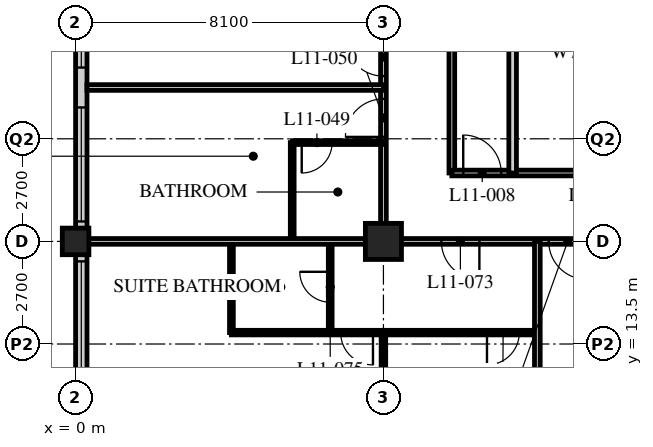
"""IFC4 building model, lengths in metres.
Left out: names, types, materials, properties, quantities, classifications, styles, units other than length and angle.
Written with IfcOpenShell. Run it as: python <this file> out.ifc"""

import sys

from ifc_helpers import new_model, si_unit, direction, frame, frame_2d, origin, origin_2d, place, context, subcontext, project, spatial, rectangle, hollow_rectangle, extrude, element, fill, save


model = new_model("IFC4")
c1 = context("Model", 3, precision=1e-05, world=origin(), true_north=direction((0.0, 1.0)))
c2 = subcontext(c1, "Body", "Model", "MODEL_VIEW")
j1 = project(units=[si_unit("LENGTHUNIT", "METRE"), si_unit("PLANEANGLEUNIT", "RADIAN")], contexts=[c1])
p1 = place(None, origin())
s1 = spatial("IfcSite", under=j1, at=p1, CompositionType="ELEMENT")
p2 = place(p1, origin())
s2 = spatial("IfcBuilding", under=s1, at=p2, CompositionType="ELEMENT")
p3 = place(p2, frame((0.0, 0.0, 50.0)))
s3 = spatial("IfcBuildingStorey", under=s2, at=p3, CompositionType="ELEMENT", Elevation=50.0)
p4 = place(p3, frame((0.0, 16.2, 0.0), z_axis=(0.0, 0.0, 1.0), x_axis=(1.0, 0.0, 0.0)))
e1 = element("IfcColumn", 1, at=p4, inside=s3, PredefinedType="COLUMN", context=c2, shape_type="SweptSolid", body=[
    extrude(hollow_rectangle(XDim=0.7, YDim=0.7, WallThickness=0.06, at=origin_2d()), origin(), (0.0, 0.0, 1.0), 3.4),
])
p5 = place(p3, frame((8.1, 16.2, 0.0), z_axis=(0.0, 0.0, 1.0), x_axis=(1.0, 0.0, 0.0)))
e2 = element("IfcColumn", 2, at=p5, inside=s3, PredefinedType="COLUMN", context=c2, shape_type="SweptSolid", body=[
    extrude(hollow_rectangle(XDim=0.95, YDim=0.95, WallThickness=0.095, at=origin_2d()), origin(), (0.0, 0.0, 1.0), 3.4),
])
p6 = place(p3, frame((0.15, 40.2, 0.0), z_axis=(0.0, 0.0, 1.0), x_axis=(0.0, -1.0, 0.0)))
e3 = element("IfcWall", 3, at=p6, inside=s3, PredefinedType="SOLIDWALL", context=c2, shape_type="SweptSolid", body=[
    extrude(rectangle(XDim=32.1, YDim=0.3, at=frame_2d((16.05, 0.0))), origin(), (0.0, 0.0, 1.0), 3.19),
])
p7 = place(p6, frame((0.225, 0.0, 0.9)))
e4 = element("IfcOpeningElement", 4, at=p7, cuts=e3, PredefinedType="OPENING", context=c2, shape_type="SweptSolid", body=[
    extrude(rectangle(XDim=3.0, YDim=2.0, at=frame_2d((1.5, 1.0))), frame((0.0, 0.16, 0.0), z_axis=(0.0, -1.0, 0.0), x_axis=(1.0, 0.0, 0.0)), (0.0, 0.0, 1.0), 0.32),
])
p8 = place(p6, frame((4.275, 0.0, 0.9)))
e5 = element("IfcOpeningElement", 5, at=p8, cuts=e3, PredefinedType="OPENING", context=c2, shape_type="SweptSolid", body=[
    extrude(rectangle(XDim=3.0, YDim=2.0, at=frame_2d((1.5, 1.0))), frame((0.0, 0.16, 0.0), z_axis=(0.0, -1.0, 0.0), x_axis=(1.0, 0.0, 0.0)), (0.0, 0.0, 1.0), 0.32),
])
p9 = place(p6, frame((8.325, 0.0, 0.9)))
e6 = element("IfcOpeningElement", 6, at=p9, cuts=e3, PredefinedType="OPENING", context=c2, shape_type="SweptSolid", body=[
    extrude(rectangle(XDim=3.0, YDim=2.0, at=frame_2d((1.5, 1.0))), frame((0.0, 0.16, 0.0), z_axis=(0.0, -1.0, 0.0), x_axis=(1.0, 0.0, 0.0)), (0.0, 0.0, 1.0), 0.32),
])
p10 = place(p6, frame((12.375, 0.0, 0.9)))
e7 = element("IfcOpeningElement", 7, at=p10, cuts=e3, PredefinedType="OPENING", context=c2, shape_type="SweptSolid", body=[
    extrude(rectangle(XDim=3.0, YDim=2.0, at=frame_2d((1.5, 1.0))), frame((0.0, 0.16, 0.0), z_axis=(0.0, -1.0, 0.0), x_axis=(1.0, 0.0, 0.0)), (0.0, 0.0, 1.0), 0.32),
])
p11 = place(p6, frame((16.425, 0.0, 0.9)))
e8 = element("IfcOpeningElement", 8, at=p11, cuts=e3, PredefinedType="OPENING", context=c2, shape_type="SweptSolid", body=[
    extrude(rectangle(XDim=3.0, YDim=2.0, at=frame_2d((1.5, 1.0))), frame((0.0, 0.16, 0.0), z_axis=(0.0, -1.0, 0.0), x_axis=(1.0, 0.0, 0.0)), (0.0, 0.0, 1.0), 0.32),
])
p12 = place(p6, frame((20.475, 0.0, 0.9)))
e9 = element("IfcOpeningElement", 9, at=p12, cuts=e3, PredefinedType="OPENING", context=c2, shape_type="SweptSolid", body=[
    extrude(rectangle(XDim=3.0, YDim=2.0, at=frame_2d((1.5, 1.0))), frame((0.0, 0.16, 0.0), z_axis=(0.0, -1.0, 0.0), x_axis=(1.0, 0.0, 0.0)), (0.0, 0.0, 1.0), 0.32),
])
p13 = place(p6, frame((24.525, 0.0, 0.9)))
e10 = element("IfcOpeningElement", 10, at=p13, cuts=e3, PredefinedType="OPENING", context=c2, shape_type="SweptSolid", body=[
    extrude(rectangle(XDim=3.0, YDim=2.0, at=frame_2d((1.5, 1.0))), frame((0.0, 0.16, 0.0), z_axis=(0.0, -1.0, 0.0), x_axis=(1.0, 0.0, 0.0)), (0.0, 0.0, 1.0), 0.32),
])
p14 = place(p6, frame((28.575, 0.0, 0.9)))
e11 = element("IfcOpeningElement", 11, at=p14, cuts=e3, PredefinedType="OPENING", context=c2, shape_type="SweptSolid", body=[
    extrude(rectangle(XDim=3.0, YDim=2.0, at=frame_2d((1.5, 1.0))), frame((0.0, 0.16, 0.0), z_axis=(0.0, -1.0, 0.0), x_axis=(1.0, 0.0, 0.0)), (0.0, 0.0, 1.0), 0.32),
])
p15 = place(p3, frame((8.1, 16.2, 0.0), z_axis=(0.0, 0.0, 1.0), x_axis=(1.0, 0.0, 0.0)))
e12 = element("IfcWall", 12, at=p15, inside=s3, PredefinedType="PARTITIONING", context=c2, shape_type="SweptSolid", body=[
    extrude(rectangle(XDim=40.5, YDim=0.15, at=frame_2d((20.25, 0.0))), origin(), (0.0, 0.0, 1.0), 2.578),
])
p16 = place(p15, frame((4.35, 0.0, 0.0)))
e13 = element("IfcOpeningElement", 13, at=p16, cuts=e12, PredefinedType="OPENING", context=c2, shape_type="SweptSolid", body=[
    extrude(rectangle(XDim=1.0, YDim=2.1, at=frame_2d((0.5, 1.05))), frame((0.0, 0.085, 0.0), z_axis=(0.0, -1.0, 0.0), x_axis=(1.0, 0.0, 0.0)), (0.0, 0.0, 1.0), 0.17),
])
p17 = place(p15, frame((10.85, 0.0, 0.0)))
e14 = element("IfcOpeningElement", 14, at=p17, cuts=e12, PredefinedType="OPENING", context=c2, shape_type="SweptSolid", body=[
    extrude(rectangle(XDim=1.0, YDim=2.1, at=frame_2d((0.5, 1.05))), frame((0.0, 0.085, 0.0), z_axis=(0.0, -1.0, 0.0), x_axis=(1.0, 0.0, 0.0)), (0.0, 0.0, 1.0), 0.17),
])
p18 = place(p15, frame((12.75, 0.0, 0.0)))
e15 = element("IfcOpeningElement", 15, at=p18, cuts=e12, PredefinedType="OPENING", context=c2, shape_type="SweptSolid", body=[
    extrude(rectangle(XDim=1.0, YDim=2.1, at=frame_2d((0.5, 1.05))), frame((0.0, 0.085, 0.0), z_axis=(0.0, -1.0, 0.0), x_axis=(1.0, 0.0, 0.0)), (0.0, 0.0, 1.0), 0.17),
])
p19 = place(p15, frame((18.95, 0.0, 0.0)))
e16 = element("IfcOpeningElement", 16, at=p19, cuts=e12, PredefinedType="OPENING", context=c2, shape_type="SweptSolid", body=[
    extrude(rectangle(XDim=1.0, YDim=2.1, at=frame_2d((0.5, 1.05))), frame((0.0, 0.085, 0.0), z_axis=(0.0, -1.0, 0.0), x_axis=(1.0, 0.0, 0.0)), (0.0, 0.0, 1.0), 0.17),
])
p20 = place(p15, frame((20.55, 0.0, 0.0)))
e17 = element("IfcOpeningElement", 17, at=p20, cuts=e12, PredefinedType="OPENING", context=c2, shape_type="SweptSolid", body=[
    extrude(rectangle(XDim=1.0, YDim=2.1, at=frame_2d((0.5, 1.05))), frame((0.0, 0.085, 0.0), z_axis=(0.0, -1.0, 0.0), x_axis=(1.0, 0.0, 0.0)), (0.0, 0.0, 1.0), 0.17),
])
p21 = place(p15, frame((27.05, 0.0, 0.0)))
e18 = element("IfcOpeningElement", 18, at=p21, cuts=e12, PredefinedType="OPENING", context=c2, shape_type="SweptSolid", body=[
    extrude(rectangle(XDim=1.0, YDim=2.1, at=frame_2d((0.5, 1.05))), frame((0.0, 0.085, 0.0), z_axis=(0.0, -1.0, 0.0), x_axis=(1.0, 0.0, 0.0)), (0.0, 0.0, 1.0), 0.17),
])
p22 = place(p15, frame((28.95, 0.0, 0.0)))
e19 = element("IfcOpeningElement", 19, at=p22, cuts=e12, PredefinedType="OPENING", context=c2, shape_type="SweptSolid", body=[
    extrude(rectangle(XDim=1.0, YDim=2.1, at=frame_2d((0.5, 1.05))), frame((0.0, 0.085, 0.0), z_axis=(0.0, -1.0, 0.0), x_axis=(1.0, 0.0, 0.0)), (0.0, 0.0, 1.0), 0.17),
])
p23 = place(p15, frame((34.85, 0.0, 0.0)))
e20 = element("IfcOpeningElement", 20, at=p23, cuts=e12, PredefinedType="OPENING", context=c2, shape_type="SweptSolid", body=[
    extrude(rectangle(XDim=1.0, YDim=2.1, at=frame_2d((0.5, 1.05))), frame((0.0, 0.085, 0.0), z_axis=(0.0, -1.0, 0.0), x_axis=(1.0, 0.0, 0.0)), (0.0, 0.0, 1.0), 0.17),
])
p24 = place(p15, frame((1.525, 0.0, 0.0)))
e21 = element("IfcOpeningElement", 21, at=p24, cuts=e12, PredefinedType="OPENING", context=c2, shape_type="SweptSolid", body=[
    extrude(rectangle(XDim=1.0, YDim=2.1, at=frame_2d((0.5, 1.05))), frame((0.0, 0.085, 0.0), z_axis=(0.0, -1.0, 0.0), x_axis=(1.0, 0.0, 0.0)), (0.0, 0.0, 1.0), 0.17),
])
p25 = place(p15, frame((37.975, 0.0, 0.0)))
e22 = element("IfcOpeningElement", 22, at=p25, cuts=e12, PredefinedType="OPENING", context=c2, shape_type="SweptSolid", body=[
    extrude(rectangle(XDim=1.0, YDim=2.1, at=frame_2d((0.5, 1.05))), frame((0.0, 0.085, 0.0), z_axis=(0.0, -1.0, 0.0), x_axis=(1.0, 0.0, 0.0)), (0.0, 0.0, 1.0), 0.17),
])
p26 = place(p3, frame((8.1, 16.2, 0.0), z_axis=(0.0, 0.0, 1.0), x_axis=(0.0, 1.0, 0.0)))
e23 = element("IfcWall", 23, at=p26, inside=s3, PredefinedType="PARTITIONING", context=c2, shape_type="SweptSolid", body=[
    extrude(rectangle(XDim=26.1, YDim=0.15, at=frame_2d((13.05, 0.0))), origin(), (0.0, 0.0, 1.0), 2.578),
])
p27 = place(p26, frame((2.75, 0.0, 0.0)))
e24 = element("IfcOpeningElement", 24, at=p27, cuts=e23, PredefinedType="OPENING", context=c2, shape_type="SweptSolid", body=[
    extrude(rectangle(XDim=1.0, YDim=2.1, at=frame_2d((0.5, 1.05))), frame((0.0, 0.085, 0.0), z_axis=(0.0, -1.0, 0.0), x_axis=(1.0, 0.0, 0.0)), (0.0, 0.0, 1.0), 0.17),
])
p28 = place(p26, frame((4.35, 0.0, 0.0)))
e25 = element("IfcOpeningElement", 25, at=p28, cuts=e23, PredefinedType="OPENING", context=c2, shape_type="SweptSolid", body=[
    extrude(rectangle(XDim=1.0, YDim=2.1, at=frame_2d((0.5, 1.05))), frame((0.0, 0.085, 0.0), z_axis=(0.0, -1.0, 0.0), x_axis=(1.0, 0.0, 0.0)), (0.0, 0.0, 1.0), 0.17),
])
p29 = place(p26, frame((10.85, 0.0, 0.0)))
e26 = element("IfcOpeningElement", 26, at=p29, cuts=e23, PredefinedType="OPENING", context=c2, shape_type="SweptSolid", body=[
    extrude(rectangle(XDim=1.0, YDim=2.1, at=frame_2d((0.5, 1.05))), frame((0.0, 0.085, 0.0), z_axis=(0.0, -1.0, 0.0), x_axis=(1.0, 0.0, 0.0)), (0.0, 0.0, 1.0), 0.17),
])
p30 = place(p26, frame((12.45, 0.0, 0.0)))
e27 = element("IfcOpeningElement", 27, at=p30, cuts=e23, PredefinedType="OPENING", context=c2, shape_type="SweptSolid", body=[
    extrude(rectangle(XDim=1.0, YDim=2.1, at=frame_2d((0.5, 1.05))), frame((0.0, 0.085, 0.0), z_axis=(0.0, -1.0, 0.0), x_axis=(1.0, 0.0, 0.0)), (0.0, 0.0, 1.0), 0.17),
])
p31 = place(p26, frame((18.65, 0.0, 0.0)))
e28 = element("IfcOpeningElement", 28, at=p31, cuts=e23, PredefinedType="OPENING", context=c2, shape_type="SweptSolid", body=[
    extrude(rectangle(XDim=1.0, YDim=2.1, at=frame_2d((0.5, 1.05))), frame((0.0, 0.085, 0.0), z_axis=(0.0, -1.0, 0.0), x_axis=(1.0, 0.0, 0.0)), (0.0, 0.0, 1.0), 0.17),
])
p32 = place(p26, frame((22.7, 0.0, 0.0)))
e29 = element("IfcOpeningElement", 29, at=p32, cuts=e23, PredefinedType="OPENING", context=c2, shape_type="SweptSolid", body=[
    extrude(rectangle(XDim=1.0, YDim=2.1, at=frame_2d((0.5, 1.05))), frame((0.0, 0.085, 0.0), z_axis=(0.0, -1.0, 0.0), x_axis=(1.0, 0.0, 0.0)), (0.0, 0.0, 1.0), 0.17),
])
p33 = place(p3, frame((9.9, 40.5, 0.0), z_axis=(0.0, 0.0, 1.0), x_axis=(0.0, -1.0, 0.0)))
e30 = element("IfcWall", 30, at=p33, inside=s3, PredefinedType="PARTITIONING", context=c2, shape_type="SweptSolid", body=[
    extrude(rectangle(XDim=22.5, YDim=0.15, at=frame_2d((11.25, 0.0))), origin(), (0.0, 0.0, 1.0), 3.19),
])
p34 = place(p33, frame((14.271, 0.0, 0.0)))
e31 = element("IfcOpeningElement", 31, at=p34, cuts=e30, PredefinedType="OPENING", context=c2, shape_type="SweptSolid", body=[
    extrude(rectangle(XDim=1.0, YDim=2.1, at=frame_2d((0.5, 1.05))), frame((0.0, 0.085, 0.0), z_axis=(0.0, -1.0, 0.0), x_axis=(1.0, 0.0, 0.0)), (0.0, 0.0, 1.0), 0.17),
])
p35 = place(p33, frame((10.221, 0.0, 0.0)))
e32 = element("IfcOpeningElement", 32, at=p35, cuts=e30, PredefinedType="OPENING", context=c2, shape_type="SweptSolid", body=[
    extrude(rectangle(XDim=1.0, YDim=2.1, at=frame_2d((0.5, 1.05))), frame((0.0, 0.085, 0.0), z_axis=(0.0, -1.0, 0.0), x_axis=(1.0, 0.0, 0.0)), (0.0, 0.0, 1.0), 0.17),
])
p36 = place(p33, frame((6.8, 0.0, 0.0)))
e33 = element("IfcOpeningElement", 33, at=p36, cuts=e30, PredefinedType="OPENING", context=c2, shape_type="SweptSolid", body=[
    extrude(rectangle(XDim=1.0, YDim=2.1, at=frame_2d((0.5, 1.05))), frame((0.0, 0.085, 0.0), z_axis=(0.0, -1.0, 0.0), x_axis=(1.0, 0.0, 0.0)), (0.0, 0.0, 1.0), 0.17),
])
p37 = place(p33, frame((2.75, 0.0, 0.0)))
e34 = element("IfcOpeningElement", 34, at=p37, cuts=e30, PredefinedType="OPENING", context=c2, shape_type="SweptSolid", body=[
    extrude(rectangle(XDim=1.0, YDim=2.1, at=frame_2d((0.5, 1.05))), frame((0.0, 0.085, 0.0), z_axis=(0.0, -1.0, 0.0), x_axis=(1.0, 0.0, 0.0)), (0.0, 0.0, 1.0), 0.17),
])
p38 = place(p3, frame((9.9, 18.0, 0.0), z_axis=(0.0, 0.0, 1.0), x_axis=(1.0, 0.0, 0.0)))
e35 = element("IfcWall", 35, at=p38, inside=s3, PredefinedType="PARTITIONING", context=c2, shape_type="SweptSolid", body=[
    extrude(rectangle(XDim=17.24, YDim=0.15, at=frame_2d((8.62, 0.0))), origin(), (0.0, 0.0, 1.0), 3.19),
])
p39 = place(p38, frame((0.3, 0.0, 0.0)))
e36 = element("IfcOpeningElement", 36, at=p39, cuts=e35, PredefinedType="OPENING", context=c2, shape_type="SweptSolid", body=[
    extrude(rectangle(XDim=1.0, YDim=2.1, at=frame_2d((0.5, 1.05))), frame((0.0, 0.085, 0.0), z_axis=(0.0, -1.0, 0.0), x_axis=(1.0, 0.0, 0.0)), (0.0, 0.0, 1.0), 0.17),
])
p40 = place(p38, frame((3.45, 0.0, 0.0)))
e37 = element("IfcOpeningElement", 37, at=p40, cuts=e35, PredefinedType="OPENING", context=c2, shape_type="SweptSolid", body=[
    extrude(rectangle(XDim=1.0, YDim=2.1, at=frame_2d((0.5, 1.05))), frame((0.0, 0.085, 0.0), z_axis=(0.0, -1.0, 0.0), x_axis=(1.0, 0.0, 0.0)), (0.0, 0.0, 1.0), 0.17),
])
p41 = place(p38, frame((7.229, 0.0, 0.0)))
e38 = element("IfcOpeningElement", 38, at=p41, cuts=e35, PredefinedType="OPENING", context=c2, shape_type="SweptSolid", body=[
    extrude(rectangle(XDim=1.0, YDim=2.1, at=frame_2d((0.5, 1.05))), frame((0.0, 0.085, 0.0), z_axis=(0.0, -1.0, 0.0), x_axis=(1.0, 0.0, 0.0)), (0.0, 0.0, 1.0), 0.17),
])
p42 = place(p38, frame((12.704, 0.0, 0.0)))
e39 = element("IfcOpeningElement", 39, at=p42, cuts=e35, PredefinedType="OPENING", context=c2, shape_type="SweptSolid", body=[
    extrude(rectangle(XDim=1.0, YDim=2.1, at=frame_2d((0.5, 1.05))), frame((0.0, 0.085, 0.0), z_axis=(0.0, -1.0, 0.0), x_axis=(1.0, 0.0, 0.0)), (0.0, 0.0, 1.0), 0.17),
])
p43 = place(p3, frame((11.5, 18.0, 0.0), z_axis=(0.0, 0.0, 1.0), x_axis=(0.0, 1.0, 0.0)))
e40 = element("IfcWall", 40, at=p43, inside=s3, PredefinedType="SOLIDWALL", context=c2, shape_type="SweptSolid", body=[
    extrude(rectangle(XDim=6.3, YDim=0.2, at=frame_2d((3.15, 0.0))), origin(), (0.0, 0.0, 1.0), 3.19),
])
p44 = place(p3, frame((5.7, 16.2, 0.0), z_axis=(0.0, 0.0, 1.0), x_axis=(0.0, 1.0, 0.0)))
e41 = element("IfcWall", 41, at=p44, inside=s3, PredefinedType="PARTITIONING", context=c2, shape_type="SweptSolid", body=[
    extrude(rectangle(XDim=2.6, YDim=0.1, at=frame_2d((1.3, 0.0))), origin(), (0.0, 0.0, 1.0), 3.19),
])
p45 = place(p3, frame((8.1, 18.8, 0.0), z_axis=(0.0, 0.0, 1.0), x_axis=(-1.0, 0.0, 0.0)))
e42 = element("IfcWall", 42, at=p45, inside=s3, PredefinedType="PARTITIONING", context=c2, shape_type="SweptSolid", body=[
    extrude(rectangle(XDim=2.4, YDim=0.1, at=frame_2d((1.2, 0.0))), origin(), (0.0, 0.0, 1.0), 3.19),
])
p46 = place(p45, frame((1.35, 0.0, 0.0)))
e43 = element("IfcOpeningElement", 43, at=p46, cuts=e42, PredefinedType="OPENING", context=c2, shape_type="SweptSolid", body=[
    extrude(rectangle(XDim=0.8, YDim=2.1, at=frame_2d((0.4, 1.05))), frame((0.0, 0.06, 0.0), z_axis=(0.0, -1.0, 0.0), x_axis=(1.0, 0.0, 0.0)), (0.0, 0.0, 1.0), 0.12),
])
p47 = place(p3, frame((8.1, 20.25, 0.0), z_axis=(0.0, 0.0, 1.0), x_axis=(-1.0, 0.0, 0.0)))
e44 = element("IfcWall", 44, at=p47, inside=s3, PredefinedType="PARTITIONING", context=c2, shape_type="SweptSolid", body=[
    extrude(rectangle(XDim=7.8, YDim=0.15, at=frame_2d((3.9, 0.0))), origin(), (0.0, 0.0, 1.0), 3.19),
])
p48 = place(p3, frame((6.7, 16.2, 0.0), z_axis=(0.0, 0.0, 1.0), x_axis=(0.0, -1.0, 0.0)))
e45 = element("IfcWall", 45, at=p48, inside=s3, PredefinedType="PARTITIONING", context=c2, shape_type="SweptSolid", body=[
    extrude(rectangle(XDim=2.4, YDim=0.1, at=frame_2d((1.2, 0.0))), origin(), (0.0, 0.0, 1.0), 3.19),
])
p49 = place(p48, frame((0.8, 0.0, 0.0)))
e46 = element("IfcOpeningElement", 46, at=p49, cuts=e45, PredefinedType="OPENING", context=c2, shape_type="SweptSolid", body=[
    extrude(rectangle(XDim=0.8, YDim=2.1, at=frame_2d((0.4, 1.05))), frame((0.0, 0.06, 0.0), z_axis=(0.0, -1.0, 0.0), x_axis=(1.0, 0.0, 0.0)), (0.0, 0.0, 1.0), 0.12),
])
p50 = place(p3, frame((4.1, 16.2, 0.0), z_axis=(0.0, 0.0, 1.0), x_axis=(0.0, -1.0, 0.0)))
e47 = element("IfcWall", 47, at=p50, inside=s3, PredefinedType="PARTITIONING", context=c2, shape_type="SweptSolid", body=[
    extrude(rectangle(XDim=2.4, YDim=0.1, at=frame_2d((1.2, 0.0))), origin(), (0.0, 0.0, 1.0), 3.19),
])
p51 = place(p3, frame((4.1, 13.8, 0.0), z_axis=(0.0, 0.0, 1.0), x_axis=(1.0, 0.0, 0.0)))
e48 = element("IfcWall", 48, at=p51, inside=s3, PredefinedType="PARTITIONING", context=c2, shape_type="SweptSolid", body=[
    extrude(rectangle(XDim=8.05, YDim=0.12, at=frame_2d((4.025, 0.0))), origin(), (0.0, 0.0, 1.0), 3.19),
])
p52 = place(p51, frame((6.725, 0.0, 0.0)))
e49 = element("IfcOpeningElement", 49, at=p52, cuts=e48, PredefinedType="OPENING", context=c2, shape_type="SweptSolid", body=[
    extrude(rectangle(XDim=0.85, YDim=2.1, at=frame_2d((0.425, 1.05))), frame((0.0, 0.07, 0.0), z_axis=(0.0, -1.0, 0.0), x_axis=(1.0, 0.0, 0.0)), (0.0, 0.0, 1.0), 0.14),
])
p53 = place(p51, frame((2.875, 0.0, 0.0)))
e50 = element("IfcOpeningElement", 50, at=p53, cuts=e48, PredefinedType="OPENING", context=c2, shape_type="SweptSolid", body=[
    extrude(rectangle(XDim=0.85, YDim=2.1, at=frame_2d((0.425, 1.05))), frame((0.0, 0.07, 0.0), z_axis=(0.0, -1.0, 0.0), x_axis=(1.0, 0.0, 0.0)), (0.0, 0.0, 1.0), 0.14),
])
p54 = place(p3, frame((8.1, 13.8, 0.0), z_axis=(0.0, 0.0, 1.0), x_axis=(0.0, -1.0, 0.0)))
e51 = element("IfcWall", 51, at=p54, inside=s3, PredefinedType="PARTITIONING", context=c2, shape_type="SweptSolid", body=[
    extrude(rectangle(XDim=9.45, YDim=0.12, at=frame_2d((4.725, 0.0))), origin(), (0.0, 0.0, 1.0), 2.578),
])
p55 = place(p3, frame((0.3, 16.2, 0.0), z_axis=(0.0, 0.0, 1.0), x_axis=(1.0, 0.0, 0.0)))
e52 = element("IfcWall", 52, at=p55, inside=s3, PredefinedType="PARTITIONING", context=c2, shape_type="SweptSolid", body=[
    extrude(rectangle(XDim=7.8, YDim=0.15, at=frame_2d((3.9, 0.0))), origin(), (0.0, 0.0, 1.0), 2.578),
])
p56 = place(p3, frame((12.15, 16.2, 0.0), z_axis=(0.0, 0.0, 1.0), x_axis=(0.0, -1.0, 0.0)))
e53 = element("IfcWall", 53, at=p56, inside=s3, PredefinedType="PARTITIONING", context=c2, shape_type="SweptSolid", body=[
    extrude(rectangle(XDim=15.9, YDim=0.15, at=frame_2d((7.95, 0.0))), origin(), (0.0, 0.0, 1.0), 3.19),
])
p57 = place(p11, origin())
e54 = element("IfcWindow", 54, at=p57, inside=s3, PartitioningType="SINGLE_PANEL", PredefinedType="WINDOW", context=c2, shape_type="SweptSolid", body=[
    extrude(rectangle(XDim=3.0, YDim=2.0, at=frame_2d((1.5, 1.0))), frame((0.0, 0.03, 0.0), z_axis=(0.0, -1.0, 0.0), x_axis=(1.0, 0.0, 0.0)), (0.0, 0.0, 1.0), 0.06),
])
fill(e8, e54)
p58 = place(p12, origin())
e55 = element("IfcWindow", 55, at=p58, inside=s3, PartitioningType="SINGLE_PANEL", PredefinedType="WINDOW", context=c2, shape_type="SweptSolid", body=[
    extrude(rectangle(XDim=3.0, YDim=2.0, at=frame_2d((1.5, 1.0))), frame((0.0, 0.03, 0.0), z_axis=(0.0, -1.0, 0.0), x_axis=(1.0, 0.0, 0.0)), (0.0, 0.0, 1.0), 0.06),
])
fill(e9, e55)
p59 = place(p13, origin())
e56 = element("IfcWindow", 56, at=p59, inside=s3, PartitioningType="SINGLE_PANEL", PredefinedType="WINDOW", context=c2, shape_type="SweptSolid", body=[
    extrude(rectangle(XDim=3.0, YDim=2.0, at=frame_2d((1.5, 1.0))), frame((0.0, 0.03, 0.0), z_axis=(0.0, -1.0, 0.0), x_axis=(1.0, 0.0, 0.0)), (0.0, 0.0, 1.0), 0.06),
])
fill(e10, e56)
p60 = place(p39, origin())
e57 = element("IfcDoor", 57, at=p60, inside=s3, OperationType="SINGLE_SWING_LEFT", PredefinedType="DOOR", context=c2, shape_type="SweptSolid", body=[
    extrude(rectangle(XDim=1.0, YDim=2.1, at=frame_2d((0.5, 1.05))), frame((0.0, 0.025, 0.0), z_axis=(0.0, -1.0, 0.0), x_axis=(1.0, 0.0, 0.0)), (0.0, 0.0, 1.0), 0.05),
])
fill(e36, e57)
p61 = place(p16, origin())
e58 = element("IfcDoor", 58, at=p61, inside=s3, OperationType="SINGLE_SWING_LEFT", PredefinedType="DOOR", context=c2, shape_type="SweptSolid", body=[
    extrude(rectangle(XDim=1.0, YDim=2.1, at=frame_2d((0.5, 1.05))), frame((0.0, 0.025, 0.0), z_axis=(0.0, -1.0, 0.0), x_axis=(1.0, 0.0, 0.0)), (0.0, 0.0, 1.0), 0.05),
])
fill(e13, e58)
p62 = place(p46, origin())
e59 = element("IfcDoor", 59, at=p62, inside=s3, OperationType="SINGLE_SWING_RIGHT", PredefinedType="DOOR", context=c2, shape_type="SweptSolid", body=[
    extrude(rectangle(XDim=0.8, YDim=2.1, at=frame_2d((0.4, 1.05))), frame((0.0, 0.025, 0.0), z_axis=(0.0, -1.0, 0.0), x_axis=(1.0, 0.0, 0.0)), (0.0, 0.0, 1.0), 0.05),
])
fill(e43, e59)
p63 = place(p27, origin())
e60 = element("IfcDoor", 60, at=p63, inside=s3, OperationType="SINGLE_SWING_LEFT", PredefinedType="DOOR", context=c2, shape_type="SweptSolid", body=[
    extrude(rectangle(XDim=1.0, YDim=2.1, at=frame_2d((0.5, 1.05))), frame((0.0, 0.025, 0.0), z_axis=(0.0, -1.0, 0.0), x_axis=(1.0, 0.0, 0.0)), (0.0, 0.0, 1.0), 0.05),
])
fill(e24, e60)
p64 = place(p28, origin())
e61 = element("IfcDoor", 61, at=p64, inside=s3, OperationType="SINGLE_SWING_RIGHT", PredefinedType="DOOR", context=c2, shape_type="SweptSolid", body=[
    extrude(rectangle(XDim=1.0, YDim=2.1, at=frame_2d((0.5, 1.05))), frame((0.0, 0.025, 0.0), z_axis=(0.0, -1.0, 0.0), x_axis=(1.0, 0.0, 0.0)), (0.0, 0.0, 1.0), 0.05),
])
fill(e25, e61)
p65 = place(p24, origin())
e62 = element("IfcDoor", 62, at=p65, inside=s3, OperationType="SINGLE_SWING_LEFT", PredefinedType="DOOR", context=c2, shape_type="SweptSolid", body=[
    extrude(rectangle(XDim=1.0, YDim=2.1, at=frame_2d((0.5, 1.05))), frame((0.0, 0.025, 0.0), z_axis=(0.0, -1.0, 0.0), x_axis=(1.0, 0.0, 0.0)), (0.0, 0.0, 1.0), 0.05),
])
fill(e21, e62)
p66 = place(p52, origin())
e63 = element("IfcDoor", 63, at=p66, inside=s3, OperationType="SINGLE_SWING_RIGHT", PredefinedType="DOOR", context=c2, shape_type="SweptSolid", body=[
    extrude(rectangle(XDim=0.85, YDim=2.1, at=frame_2d((0.425, 1.05))), frame((0.0, 0.025, 0.0), z_axis=(0.0, -1.0, 0.0), x_axis=(1.0, 0.0, 0.0)), (0.0, 0.0, 1.0), 0.05),
])
fill(e49, e63)
p67 = place(p49, origin())
e64 = element("IfcDoor", 64, at=p67, inside=s3, OperationType="SINGLE_SWING_RIGHT", PredefinedType="DOOR", context=c2, shape_type="SweptSolid", body=[
    extrude(rectangle(XDim=0.8, YDim=2.1, at=frame_2d((0.4, 1.05))), frame((0.0, 0.025, 0.0), z_axis=(0.0, -1.0, 0.0), x_axis=(1.0, 0.0, 0.0)), (0.0, 0.0, 1.0), 0.05),
])
fill(e46, e64)
p68 = place(p53, origin())
e65 = element("IfcDoor", 65, at=p68, inside=s3, OperationType="SINGLE_SWING_LEFT", PredefinedType="DOOR", context=c2, shape_type="SweptSolid", body=[
    extrude(rectangle(XDim=0.85, YDim=2.1, at=frame_2d((0.425, 1.05))), frame((0.0, 0.025, 0.0), z_axis=(0.0, -1.0, 0.0), x_axis=(1.0, 0.0, 0.0)), (0.0, 0.0, 1.0), 0.05),
])
fill(e50, e65)
save(model, sys.argv[1])
